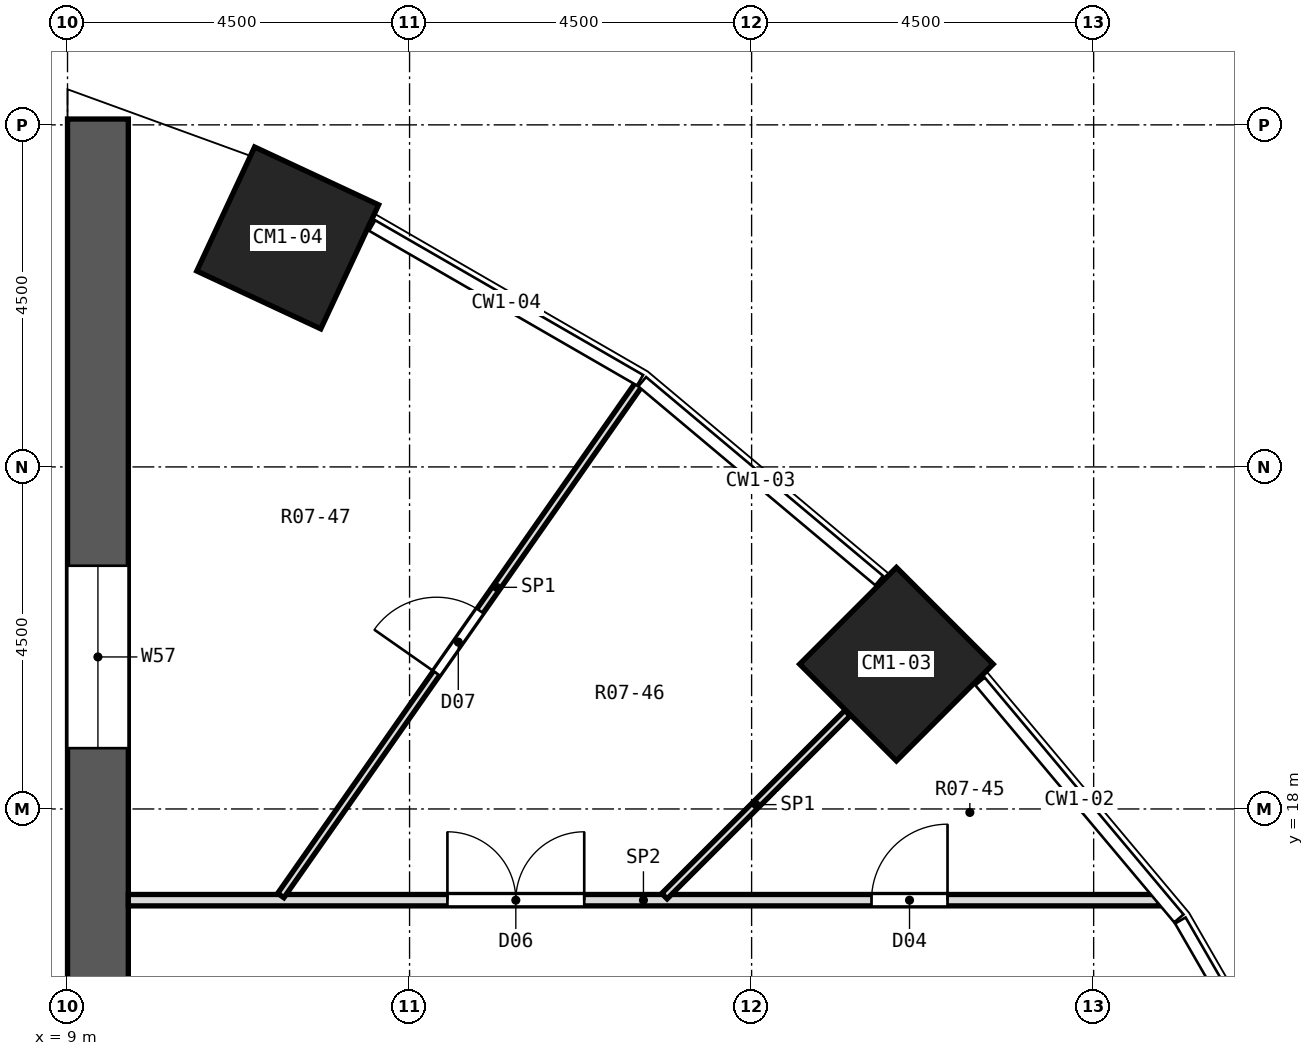
"""IFC4 building model, lengths in metres.
Left out: names, types, materials, properties, quantities, classifications, styles, units other than length and angle.
Written with IfcOpenShell. Run it as: python <this file> out.ifc"""

import sys

from ifc_helpers import new_model, si_unit, direction, frame, frame_2d, origin, origin_2d, place, context, subcontext, project, spatial, polyline, rectangle, outline, extrude, element, fill, save


model = new_model("IFC4")
c1 = context("Model", 3, precision=1e-05, world=origin(), true_north=direction((0.0, 1.0)))
c2 = subcontext(c1, "Body", "Model", "MODEL_VIEW")
j1 = project(units=[si_unit("LENGTHUNIT", "METRE"), si_unit("PLANEANGLEUNIT", "RADIAN")], contexts=[c1])
p1 = place(None, origin())
s1 = spatial("IfcSite", under=j1, at=p1, CompositionType="ELEMENT")
p2 = place(p1, origin())
s2 = spatial("IfcBuilding", under=s1, at=p2, CompositionType="ELEMENT")
p3 = place(p2, frame((0.0, 0.0, 17.6)))
s3 = spatial("IfcBuildingStorey", under=s2, at=p3, CompositionType="ELEMENT", Elevation=17.6)
for number, where, z_axis, x_axis in (
    (1, (19.905, 19.905, 0.0), (0.0, 0.0, 1.0), (0.707, 0.707, 0.0)),
    (2, (11.897, 25.512, 0.0), (0.0, 0.0, 1.0), (0.423, 0.906, 0.0)),
):
    element("IfcColumn", number, at=place(p3, frame(where, z_axis=z_axis, x_axis=x_axis)), inside=s3, PredefinedType="COLUMN", context=c2, shape_type="SweptSolid", body=[
        extrude(rectangle(XDim=1.8, YDim=1.8, at=origin_2d()), origin(), (0.0, 0.0, 1.0), 4.2),
    ])
p4 = place(p3, frame((9.4, -27.077, 0.0), z_axis=(0.0, 0.0, 1.0), x_axis=(0.0, 1.0, 0.0)))
e3 = element("IfcWall", 3, at=p4, inside=s3, PredefinedType="SHEAR", context=c2, shape_type="SweptSolid", body=[
    extrude(rectangle(XDim=54.154, YDim=0.8, at=frame_2d((27.077, 0.0))), origin(), (0.0, 0.0, 1.0), 4.2),
])
p5 = place(p4, frame((13.277, 0.0, 0.9)))
e4 = element("IfcOpeningElement", 4, at=p5, cuts=e3, PredefinedType="OPENING", context=c2, shape_type="SweptSolid", body=[
    extrude(rectangle(XDim=2.4, YDim=2.1, at=frame_2d((1.2, 1.05))), frame((0.0, 0.412, 0.0), z_axis=(0.0, -1.0, 0.0), x_axis=(1.0, 0.0, 0.0)), (0.0, 0.0, 1.0), 0.824),
])
p6 = place(p4, frame((17.877, 0.0, 0.9)))
e5 = element("IfcOpeningElement", 5, at=p6, cuts=e3, PredefinedType="OPENING", context=c2, shape_type="SweptSolid", body=[
    extrude(rectangle(XDim=2.4, YDim=2.1, at=frame_2d((1.2, 1.05))), frame((0.0, 0.412, 0.0), z_axis=(0.0, -1.0, 0.0), x_axis=(1.0, 0.0, 0.0)), (0.0, 0.0, 1.0), 0.824),
])
p7 = place(p4, frame((22.477, 0.0, 0.9)))
e6 = element("IfcOpeningElement", 6, at=p7, cuts=e3, PredefinedType="OPENING", context=c2, shape_type="SweptSolid", body=[
    extrude(rectangle(XDim=2.4, YDim=2.1, at=frame_2d((1.2, 1.05))), frame((0.0, 0.412, 0.0), z_axis=(0.0, -1.0, 0.0), x_axis=(1.0, 0.0, 0.0)), (0.0, 0.0, 1.0), 0.824),
])
p8 = place(p4, frame((29.277, 0.0, 0.9)))
e7 = element("IfcOpeningElement", 7, at=p8, cuts=e3, PredefinedType="OPENING", context=c2, shape_type="SweptSolid", body=[
    extrude(rectangle(XDim=2.4, YDim=2.1, at=frame_2d((1.2, 1.05))), frame((0.0, 0.412, 0.0), z_axis=(0.0, -1.0, 0.0), x_axis=(1.0, 0.0, 0.0)), (0.0, 0.0, 1.0), 0.824),
])
p9 = place(p4, frame((33.877, 0.0, 0.9)))
e8 = element("IfcOpeningElement", 8, at=p9, cuts=e3, PredefinedType="OPENING", context=c2, shape_type="SweptSolid", body=[
    extrude(rectangle(XDim=2.4, YDim=2.1, at=frame_2d((1.2, 1.05))), frame((0.0, 0.412, 0.0), z_axis=(0.0, -1.0, 0.0), x_axis=(1.0, 0.0, 0.0)), (0.0, 0.0, 1.0), 0.824),
])
p10 = place(p4, frame((38.477, 0.0, 0.9)))
e9 = element("IfcOpeningElement", 9, at=p10, cuts=e3, PredefinedType="OPENING", context=c2, shape_type="SweptSolid", body=[
    extrude(rectangle(XDim=2.4, YDim=2.1, at=frame_2d((1.2, 1.05))), frame((0.0, 0.412, 0.0), z_axis=(0.0, -1.0, 0.0), x_axis=(1.0, 0.0, 0.0)), (0.0, 0.0, 1.0), 0.824),
])
p11 = place(p4, frame((5.877, 0.0, 0.9)))
e10 = element("IfcOpeningElement", 10, at=p11, cuts=e3, PredefinedType="OPENING", context=c2, shape_type="SweptSolid", body=[
    extrude(rectangle(XDim=2.4, YDim=2.1, at=frame_2d((1.2, 1.05))), frame((0.0, 0.412, 0.0), z_axis=(0.0, -1.0, 0.0), x_axis=(1.0, 0.0, 0.0)), (0.0, 0.0, 1.0), 0.824),
])
p12 = place(p4, frame((45.877, 0.0, 0.9)))
e11 = element("IfcOpeningElement", 11, at=p12, cuts=e3, PredefinedType="OPENING", context=c2, shape_type="SweptSolid", body=[
    extrude(rectangle(XDim=2.4, YDim=2.1, at=frame_2d((1.2, 1.05))), frame((0.0, 0.412, 0.0), z_axis=(0.0, -1.0, 0.0), x_axis=(1.0, 0.0, 0.0)), (0.0, 0.0, 1.0), 0.824),
])
p13 = place(p3, frame((11.629, 26.474, 0.0), z_axis=(0.342019741746, 0.939690603584, 0.002016380761), x_axis=(-0.00067819462, -0.001898944936, 0.999997967028)))
e12 = element("IfcWall", 12, at=p13, inside=s3, PredefinedType="SOLIDWALL", context=c2, shape_type="SweptSolid", body=[
    extrude(outline(polyline([(0.0, 0.0), (3.6, -1.423e-19), (3.6, -3.745), (-4.563e-05, -3.745), (0.0, 0.0)])), origin(), (0.0, 0.0, -1.0), 0.38),
])
p14 = place(p3, frame((9.8, 16.8, 0.0), z_axis=(0.0, 0.0, 1.0), x_axis=(1.0, 0.0, 0.0)))
e13 = element("IfcWall", 13, at=p14, inside=s3, PredefinedType="PARTITIONING", context=c2, shape_type="SweptSolid", body=[
    extrude(rectangle(XDim=13.555, YDim=0.15, at=frame_2d((6.777, 0.0))), origin(), (0.0, 0.0, 1.0), 3.6),
])
p15 = place(p14, frame((9.778, 0.0, 0.0)))
e14 = element("IfcOpeningElement", 14, at=p15, cuts=e13, PredefinedType="OPENING", context=c2, shape_type="SweptSolid", body=[
    extrude(rectangle(XDim=1.0, YDim=2.1, at=frame_2d((0.5, 1.05))), frame((0.0, 0.087, 0.0), z_axis=(0.0, -1.0, 0.0), x_axis=(1.0, 0.0, 0.0)), (0.0, 0.0, 1.0), 0.174),
])
p16 = place(p14, frame((4.198, 0.0, 0.0)))
e15 = element("IfcOpeningElement", 15, at=p16, cuts=e13, PredefinedType="OPENING", context=c2, shape_type="SweptSolid", body=[
    extrude(rectangle(XDim=1.8, YDim=2.1, at=frame_2d((0.9, 1.05))), frame((0.0, 0.087, 0.0), z_axis=(0.0, -1.0, 0.0), x_axis=(1.0, 0.0, 0.0)), (0.0, 0.0, 1.0), 0.174),
])
p17 = place(p3, frame((16.853, 16.853, 0.0), z_axis=(0.0, 0.0, 1.0), x_axis=(0.707106781187, 0.707106781187, 0.0)))
e16 = element("IfcWall", 16, at=p17, inside=s3, PredefinedType="PARTITIONING", context=c2, shape_type="SweptSolid", body=[
    extrude(rectangle(XDim=3.406, YDim=0.1, at=frame_2d((1.703, 0.0))), origin(), (0.0, 0.0, 1.0), 3.6),
])
p18 = place(p3, frame((11.806, 16.861, 0.0), z_axis=(0.0, 0.0, 1.0), x_axis=(0.573651788308, 0.819099277115, 0.0)))
e17 = element("IfcWall", 17, at=p18, inside=s3, PredefinedType="PARTITIONING", context=c2, shape_type="SweptSolid", body=[
    extrude(rectangle(XDim=8.216, YDim=0.1, at=frame_2d((4.108, 0.0))), origin(), (0.0, 0.0, 1.0), 3.6),
])
p19 = place(p18, frame((3.57, 0.0, 0.0)))
e18 = element("IfcOpeningElement", 18, at=p19, cuts=e17, PredefinedType="OPENING", context=c2, shape_type="SweptSolid", body=[
    extrude(rectangle(XDim=1.0, YDim=2.1, at=frame_2d((0.5, 1.05))), frame((0.0, 0.062, 0.0), z_axis=(0.0, -1.0, 0.0), x_axis=(1.0, 0.0, 0.0)), (0.0, 0.0, 1.0), 0.124),
])
p20 = place(p15, origin())
e19 = element("IfcDoor", 19, at=p20, inside=s3, OperationType="SINGLE_SWING_RIGHT", PredefinedType="DOOR", context=c2, shape_type="SweptSolid", body=[
    extrude(rectangle(XDim=1.0, YDim=2.1, at=frame_2d((0.5, 1.05))), frame((0.0, 0.025, 0.0), z_axis=(0.0, -1.0, 0.0), x_axis=(1.0, 0.0, 0.0)), (0.0, 0.0, 1.0), 0.05),
])
fill(e14, e19)
p21 = place(p16, origin())
e20 = element("IfcDoor", 20, at=p21, inside=s3, OperationType="DOUBLE_DOOR_SINGLE_SWING", PredefinedType="DOOR", context=c2, shape_type="SweptSolid", body=[
    extrude(rectangle(XDim=1.8, YDim=2.1, at=frame_2d((0.9, 1.05))), frame((0.0, 0.025, 0.0), z_axis=(0.0, -1.0, 0.0), x_axis=(1.0, 0.0, 0.0)), (0.0, 0.0, 1.0), 0.05),
])
fill(e15, e20)
p22 = place(p19, origin())
e21 = element("IfcDoor", 21, at=p22, inside=s3, OperationType="SINGLE_SWING_LEFT", PredefinedType="DOOR", context=c2, shape_type="SweptSolid", body=[
    extrude(rectangle(XDim=1.0, YDim=2.1, at=frame_2d((0.5, 1.05))), frame((0.0, 0.025, 0.0), z_axis=(0.0, -1.0, 0.0), x_axis=(1.0, 0.0, 0.0)), (0.0, 0.0, 1.0), 0.05),
])
fill(e18, e21)
p23 = place(p12, origin())
e22 = element("IfcWindow", 22, at=p23, inside=s3, PartitioningType="SINGLE_PANEL", PredefinedType="WINDOW", context=c2, shape_type="SweptSolid", body=[
    extrude(rectangle(XDim=2.4, YDim=2.1, at=frame_2d((1.2, 1.05))), frame((0.0, 0.03, 0.0), z_axis=(0.0, -1.0, 0.0), x_axis=(1.0, 0.0, 0.0)), (0.0, 0.0, 1.0), 0.06),
])
fill(e11, e22)
save(model, sys.argv[1])
